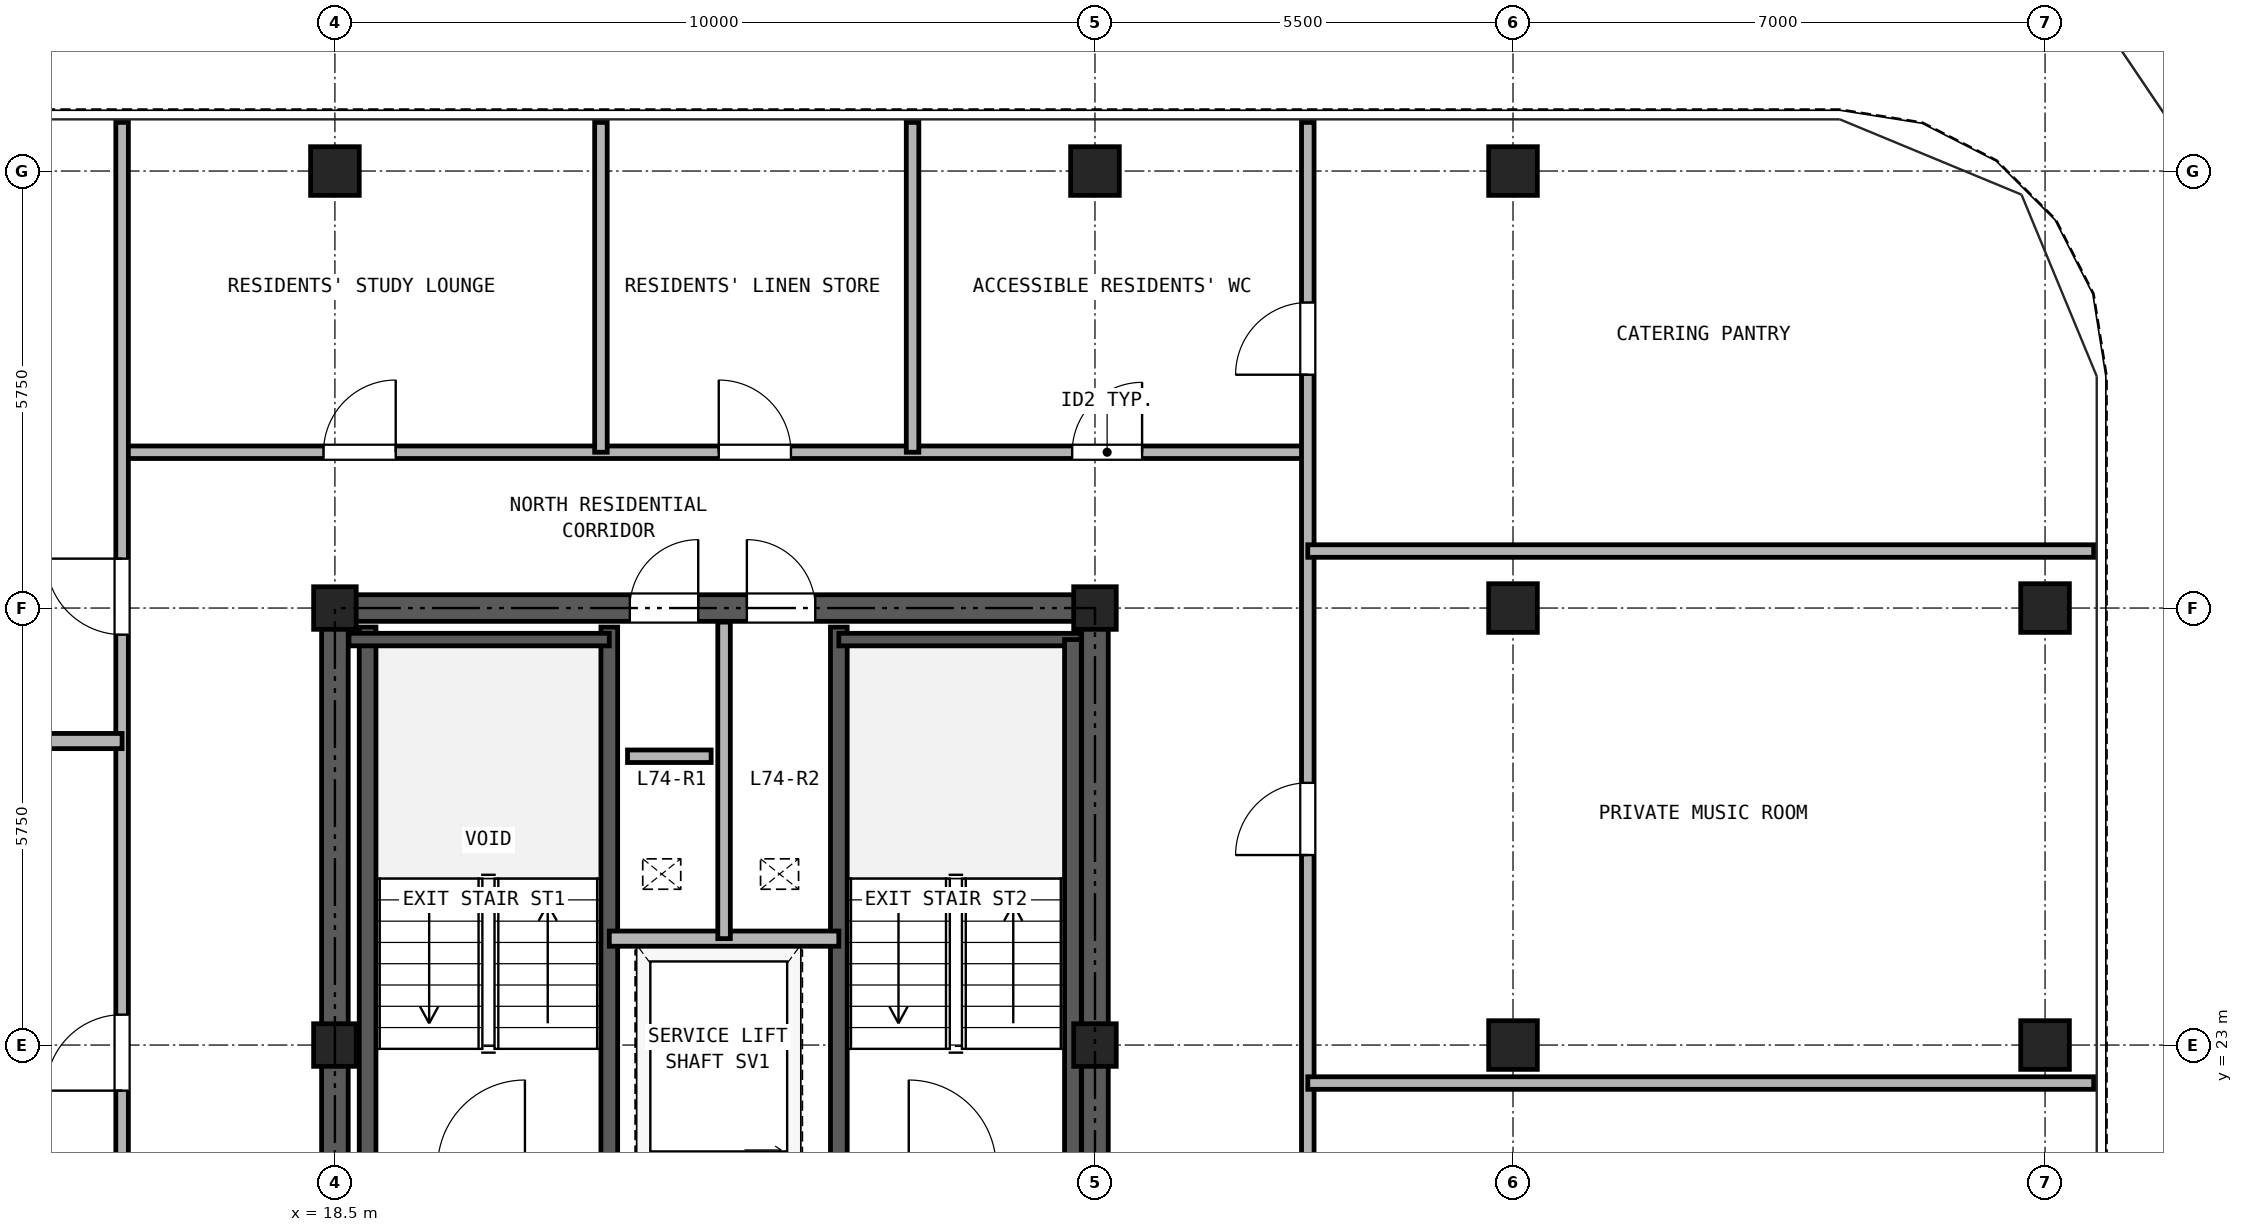
"""IFC4 building model, lengths in metres.
Left out: names, types, materials, properties, quantities, classifications, styles, units other than length and angle.
Written with IfcOpenShell. Run it as: python <this file> out.ifc"""

import sys

from ifc_helpers import new_model, si_unit, direction, frame, frame_2d, origin, origin_2d, place, context, subcontext, project, spatial, rectangle, hollow_rectangle, extrude, source, transform, mapped, element, fill, save


model = new_model("IFC4")
c1 = context("Model", 3, precision=1e-05, world=origin(), true_north=direction((0.0, 1.0)))
c2 = subcontext(c1, "Body", "Model", "MODEL_VIEW")
j1 = project(units=[si_unit("LENGTHUNIT", "METRE"), si_unit("PLANEANGLEUNIT", "RADIAN")], contexts=[c1])
p1 = place(None, origin())
s1 = spatial("IfcSite", under=j1, at=p1, CompositionType="ELEMENT")
p2 = place(p1, origin())
s2 = spatial("IfcBuilding", under=s1, at=p2, CompositionType="ELEMENT")
p3 = place(p2, frame((0.0, 0.0, 258.5)))
s3 = spatial("IfcBuildingStorey", under=s2, at=p3, CompositionType="ELEMENT", Elevation=258.5)
m1 = source(origin(), c2, "Body", "SweptSolid", [
    extrude(hollow_rectangle(XDim=0.64, YDim=0.64, WallThickness=0.035, at=origin_2d()), origin(), (0.0, 0.0, 1.0), 2.98),
])
for number, where, z_axis, x_axis in (
    (1, (18.5, 34.5, 0.0), (0.0, 0.0, 1.0), (1.0, 0.0, 0.0)),
    (2, (28.5, 34.5, 0.0), (0.0, 0.0, 1.0), (1.0, 0.0, 0.0)),
    (3, (34.0, 34.5, 0.0), (0.0, 0.0, 1.0), (1.0, 0.0, 0.0)),
    (4, (41.0, 23.0, 0.0), (0.0, 0.0, 1.0), (1.0, 0.0, 0.0)),
    (5, (41.0, 28.75, 0.0), (0.0, 0.0, 1.0), (1.0, 0.0, 0.0)),
):
    element("IfcColumn", number, at=place(p3, frame(where, z_axis=z_axis, x_axis=x_axis)), inside=s3, PredefinedType="COLUMN", context=c2, shape_type="MappedRepresentation", body=[
        mapped(m1, transform((0.0, 0.0, 0.0), x_axis=(1.0, 0.0, 0.0), y_axis=(0.0, 1.0, 0.0), z_axis=(0.0, 0.0, 1.0), scale=1.0)),
    ])
m2 = source(origin(), c2, "Body", "SweptSolid", [
    extrude(hollow_rectangle(XDim=0.56, YDim=0.56, WallThickness=0.03, at=origin_2d()), origin(), (0.0, 0.0, 1.0), 2.98),
])
for number, where, z_axis, x_axis in (
    (6, (18.5, 23.0, 0.0), (0.0, 0.0, 1.0), (1.0, 0.0, 0.0)),
    (7, (18.5, 28.75, 0.0), (0.0, 0.0, 1.0), (1.0, 0.0, 0.0)),
    (8, (28.5, 23.0, 0.0), (0.0, 0.0, 1.0), (1.0, 0.0, 0.0)),
    (9, (28.5, 28.75, 0.0), (0.0, 0.0, 1.0), (1.0, 0.0, 0.0)),
):
    element("IfcColumn", number, at=place(p3, frame(where, z_axis=z_axis, x_axis=x_axis)), inside=s3, PredefinedType="COLUMN", context=c2, shape_type="MappedRepresentation", body=[
        mapped(m2, transform((0.0, 0.0, 0.0), x_axis=(1.0, 0.0, 0.0), y_axis=(0.0, 1.0, 0.0), z_axis=(0.0, 0.0, 1.0), scale=1.0)),
    ])
for number, where, z_axis, x_axis in (
    (10, (34.0, 23.0, 0.0), (0.0, 0.0, 1.0), (1.0, 0.0, 0.0)),
    (11, (34.0, 28.75, 0.0), (0.0, 0.0, 1.0), (1.0, 0.0, 0.0)),
):
    element("IfcColumn", number, at=place(p3, frame(where, z_axis=z_axis, x_axis=x_axis)), inside=s3, PredefinedType="COLUMN", context=c2, shape_type="MappedRepresentation", body=[
        mapped(m1, transform((0.0, 0.0, 0.0), x_axis=(1.0, 0.0, 0.0), y_axis=(0.0, 1.0, 0.0), z_axis=(0.0, 0.0, 1.0), scale=1.0)),
    ])
p4 = place(p3, frame((18.325, 28.75, 0.0), z_axis=(0.0, 0.0, 1.0), x_axis=(1.0, 0.0, 0.0)))
e12 = element("IfcWall", 12, at=p4, inside=s3, PredefinedType="SHEAR", context=c2, shape_type="SweptSolid", body=[
    extrude(rectangle(XDim=10.35, YDim=0.35, at=frame_2d((5.175, 0.0))), origin(), (0.0, 0.0, 1.0), 2.98),
])
p5 = place(p4, frame((4.055, 0.0, 0.0)))
e13 = element("IfcOpeningElement", 13, at=p5, cuts=e12, PredefinedType="OPENING", context=c2, shape_type="SweptSolid", body=[
    extrude(rectangle(XDim=0.9, YDim=2.05, at=frame_2d((0.45, 1.025))), frame((0.0, 0.185, 0.0), z_axis=(0.0, -1.0, 0.0), x_axis=(1.0, 0.0, 0.0)), (0.0, 0.0, 1.0), 0.37),
])
p6 = place(p4, frame((5.595, 0.0, 0.0)))
e14 = element("IfcOpeningElement", 14, at=p6, cuts=e12, PredefinedType="OPENING", context=c2, shape_type="SweptSolid", body=[
    extrude(rectangle(XDim=0.9, YDim=2.05, at=frame_2d((0.45, 1.025))), frame((0.0, 0.185, 0.0), z_axis=(0.0, -1.0, 0.0), x_axis=(1.0, 0.0, 0.0)), (0.0, 0.0, 1.0), 0.37),
])
p7 = place(p3, frame((18.5, 11.675, 0.0), z_axis=(0.0, 0.0, 1.0), x_axis=(0.0, 1.0, 0.0)))
e15 = element("IfcWall", 15, at=p7, inside=s3, PredefinedType="SHEAR", context=c2, shape_type="SweptSolid", body=[
    extrude(rectangle(XDim=16.9, YDim=0.35, at=frame_2d((8.45, 0.0))), origin(), (0.0, 0.0, 1.0), 2.98),
])
p8 = place(p7, frame((7.475, 0.0, 0.0)))
e16 = element("IfcOpeningElement", 16, at=p8, cuts=e15, PredefinedType="OPENING", context=c2, shape_type="SweptSolid", body=[
    extrude(rectangle(XDim=1.15, YDim=2.2, at=frame_2d((0.575, 1.1))), frame((0.0, 0.185, 0.0), z_axis=(0.0, -1.0, 0.0), x_axis=(1.0, 0.0, 0.0)), (0.0, 0.0, 1.0), 0.37),
])
p9 = place(p3, frame((28.5, 11.675, 0.0), z_axis=(0.0, 0.0, 1.0), x_axis=(0.0, 1.0, 0.0)))
e17 = element("IfcWall", 17, at=p9, inside=s3, PredefinedType="SHEAR", context=c2, shape_type="SweptSolid", body=[
    extrude(rectangle(XDim=16.9, YDim=0.35, at=frame_2d((8.45, 0.0))), origin(), (0.0, 0.0, 1.0), 2.98),
])
p10 = place(p9, frame((7.475, 0.0, 0.0)))
e18 = element("IfcOpeningElement", 18, at=p10, cuts=e17, PredefinedType="OPENING", context=c2, shape_type="SweptSolid", body=[
    extrude(rectangle(XDim=1.15, YDim=2.2, at=frame_2d((0.575, 1.1))), frame((0.0, 0.185, 0.0), z_axis=(0.0, -1.0, 0.0), x_axis=(1.0, 0.0, 0.0)), (0.0, 0.0, 1.0), 0.37),
])
for number, where, z_axis, x_axis in (
    (19, (18.93, 21.39, 0.0), (0.0, 0.0, 1.0), (0.0, 1.0, 0.0)),
    (20, (22.11, 21.39, 0.0), (0.0, 0.0, 1.0), (0.0, 1.0, 0.0)),
    (21, (25.13, 21.39, 0.0), (0.0, 0.0, 1.0), (0.0, 1.0, 0.0)),
):
    element("IfcWall", number, at=place(p3, frame(where, z_axis=z_axis, x_axis=x_axis)), inside=s3, PredefinedType="SOLIDWALL", context=c2, shape_type="SweptSolid", body=[
        extrude(rectangle(XDim=7.11, YDim=0.22, at=frame_2d((3.555, 0.0))), origin(), (0.0, 0.0, 1.0), 2.98),
    ])
p11 = place(p3, frame((18.685, 28.335, 0.0), z_axis=(0.0, 0.0, 1.0), x_axis=(1.0, 0.0, 0.0)))
e22 = element("IfcWall", 22, at=p11, inside=s3, PredefinedType="PARTITIONING", context=c2, shape_type="SweptSolid", body=[
    extrude(rectangle(XDim=3.425, YDim=0.165, at=frame_2d((1.712, 0.0))), origin(), (0.0, 0.0, 1.0), 2.98),
])
p12 = place(p3, frame((25.13, 28.335, 0.0), z_axis=(0.0, 0.0, 1.0), x_axis=(1.0, 0.0, 0.0)))
e23 = element("IfcWall", 23, at=p12, inside=s3, PredefinedType="PARTITIONING", context=c2, shape_type="SweptSolid", body=[
    extrude(rectangle(XDim=3.185, YDim=0.165, at=frame_2d((1.593, 0.0))), origin(), (0.0, 0.0, 1.0), 2.98),
])
p13 = place(p3, frame((28.21, 21.39, 0.0), z_axis=(0.0, 0.0, 1.0), x_axis=(0.0, 1.0, 0.0)))
e24 = element("IfcWall", 24, at=p13, inside=s3, PredefinedType="SOLIDWALL", context=c2, shape_type="SweptSolid", body=[
    extrude(rectangle(XDim=6.945, YDim=0.22, at=frame_2d((3.473, 0.0))), origin(), (0.0, 0.0, 1.0), 2.98),
])
p14 = place(p3, frame((22.11, 24.4, 0.0), z_axis=(0.0, 0.0, 1.0), x_axis=(1.0, 0.0, 0.0)))
e25 = element("IfcWall", 25, at=p14, inside=s3, PredefinedType="PARTITIONING", context=c2, shape_type="SweptSolid", body=[
    extrude(rectangle(XDim=3.02, YDim=0.2, at=frame_2d((1.51, 0.0))), origin(), (0.0, 0.0, 1.0), 2.98),
])
p15 = place(p3, frame((23.62, 24.4, 0.0), z_axis=(0.0, 0.0, 1.0), x_axis=(0.0, 1.0, 0.0)))
e26 = element("IfcWall", 26, at=p15, inside=s3, PredefinedType="PARTITIONING", context=c2, shape_type="SweptSolid", body=[
    extrude(rectangle(XDim=4.165, YDim=0.165, at=frame_2d((2.083, 0.0))), origin(), (0.0, 0.0, 1.0), 2.98),
])
p16 = place(p3, frame((15.7, 30.8, 0.0), z_axis=(0.0, 0.0, 1.0), x_axis=(1.0, 0.0, 0.0)))
e27 = element("IfcWall", 27, at=p16, inside=s3, PredefinedType="PARTITIONING", context=c2, shape_type="SweptSolid", body=[
    extrude(rectangle(XDim=15.6, YDim=0.165, at=frame_2d((7.8, 0.0))), origin(), (0.0, 0.0, 1.0), 2.98),
])
p17 = place(p16, frame((2.65, 0.0, 0.0)))
e28 = element("IfcOpeningElement", 28, at=p17, cuts=e27, PredefinedType="OPENING", context=c2, shape_type="SweptSolid", body=[
    extrude(rectangle(XDim=0.95, YDim=2.15, at=frame_2d((0.475, 1.075))), frame((0.0, 0.093, 0.0), z_axis=(0.0, -1.0, 0.0), x_axis=(1.0, 0.0, 0.0)), (0.0, 0.0, 1.0), 0.185),
])
p18 = place(p16, frame((7.85, 0.0, 0.0)))
e29 = element("IfcOpeningElement", 29, at=p18, cuts=e27, PredefinedType="OPENING", context=c2, shape_type="SweptSolid", body=[
    extrude(rectangle(XDim=0.95, YDim=2.15, at=frame_2d((0.475, 1.075))), frame((0.0, 0.093, 0.0), z_axis=(0.0, -1.0, 0.0), x_axis=(1.0, 0.0, 0.0)), (0.0, 0.0, 1.0), 0.185),
])
p19 = place(p16, frame((12.5, 0.0, 0.0)))
e30 = element("IfcOpeningElement", 30, at=p19, cuts=e27, PredefinedType="OPENING", context=c2, shape_type="SweptSolid", body=[
    extrude(rectangle(XDim=0.92, YDim=2.1, at=frame_2d((0.46, 1.05))), frame((0.0, 0.093, 0.0), z_axis=(0.0, -1.0, 0.0), x_axis=(1.0, 0.0, 0.0)), (0.0, 0.0, 1.0), 0.185),
])
p20 = place(p3, frame((15.7, 10.85, 0.0), z_axis=(0.0, 0.0, 1.0), x_axis=(0.0, 1.0, 0.0)))
e31 = element("IfcWall", 31, at=p20, inside=s3, PredefinedType="PARTITIONING", context=c2, shape_type="SweptSolid", body=[
    extrude(rectangle(XDim=24.29, YDim=0.165, at=frame_2d((12.145, 0.0))), origin(), (0.0, 0.0, 1.0), 2.98),
])
p21 = place(p20, frame((3.475, 0.0, 0.0)))
e32 = element("IfcOpeningElement", 32, at=p21, cuts=e31, PredefinedType="OPENING", context=c2, shape_type="SweptSolid", body=[
    extrude(rectangle(XDim=1.0, YDim=2.15, at=frame_2d((0.5, 1.075))), frame((0.0, 0.093, 0.0), z_axis=(0.0, -1.0, 0.0), x_axis=(1.0, 0.0, 0.0)), (0.0, 0.0, 1.0), 0.185),
])
p22 = place(p20, frame((11.55, 0.0, 0.0)))
e33 = element("IfcOpeningElement", 33, at=p22, cuts=e31, PredefinedType="OPENING", context=c2, shape_type="SweptSolid", body=[
    extrude(rectangle(XDim=1.0, YDim=2.15, at=frame_2d((0.5, 1.075))), frame((0.0, 0.093, 0.0), z_axis=(0.0, -1.0, 0.0), x_axis=(1.0, 0.0, 0.0)), (0.0, 0.0, 1.0), 0.185),
])
p23 = place(p20, frame((17.55, 0.0, 0.0)))
e34 = element("IfcOpeningElement", 34, at=p23, cuts=e31, PredefinedType="OPENING", context=c2, shape_type="SweptSolid", body=[
    extrude(rectangle(XDim=1.0, YDim=2.15, at=frame_2d((0.5, 1.075))), frame((0.0, 0.093, 0.0), z_axis=(0.0, -1.0, 0.0), x_axis=(1.0, 0.0, 0.0)), (0.0, 0.0, 1.0), 0.185),
])
p24 = place(p3, frame((31.3, 10.85, 0.0), z_axis=(0.0, 0.0, 1.0), x_axis=(0.0, 1.0, 0.0)))
e35 = element("IfcWall", 35, at=p24, inside=s3, PredefinedType="PARTITIONING", context=c2, shape_type="SweptSolid", body=[
    extrude(rectangle(XDim=24.29, YDim=0.165, at=frame_2d((12.145, 0.0))), origin(), (0.0, 0.0, 1.0), 2.98),
])
p25 = place(p24, frame((5.325, 0.0, 0.0)))
e36 = element("IfcOpeningElement", 36, at=p25, cuts=e35, PredefinedType="OPENING", context=c2, shape_type="SweptSolid", body=[
    extrude(rectangle(XDim=0.95, YDim=2.15, at=frame_2d((0.475, 1.075))), frame((0.0, 0.093, 0.0), z_axis=(0.0, -1.0, 0.0), x_axis=(1.0, 0.0, 0.0)), (0.0, 0.0, 1.0), 0.185),
])
p26 = place(p24, frame((14.65, 0.0, 0.0)))
e37 = element("IfcOpeningElement", 37, at=p26, cuts=e35, PredefinedType="OPENING", context=c2, shape_type="SweptSolid", body=[
    extrude(rectangle(XDim=0.95, YDim=2.15, at=frame_2d((0.475, 1.075))), frame((0.0, 0.093, 0.0), z_axis=(0.0, -1.0, 0.0), x_axis=(1.0, 0.0, 0.0)), (0.0, 0.0, 1.0), 0.185),
])
p27 = place(p24, frame((20.97, 0.0, 0.0)))
e38 = element("IfcOpeningElement", 38, at=p27, cuts=e35, PredefinedType="OPENING", context=c2, shape_type="SweptSolid", body=[
    extrude(rectangle(XDim=0.95, YDim=2.15, at=frame_2d((0.475, 1.075))), frame((0.0, 0.093, 0.0), z_axis=(0.0, -1.0, 0.0), x_axis=(1.0, 0.0, 0.0)), (0.0, 0.0, 1.0), 0.185),
])
p28 = place(p3, frame((5.36, 27.0, 0.0), z_axis=(0.0, 0.0, 1.0), x_axis=(1.0, 0.0, 0.0)))
e39 = element("IfcWall", 39, at=p28, inside=s3, PredefinedType="PARTITIONING", context=c2, shape_type="SweptSolid", body=[
    extrude(rectangle(XDim=10.34, YDim=0.2, at=frame_2d((5.17, 0.0))), origin(), (0.0, 0.0, 1.0), 2.98),
])
for number, where, z_axis, x_axis in (
    (40, (31.3, 22.5, 0.0), (0.0, 0.0, 1.0), (1.0, 0.0, 0.0)),
    (41, (31.3, 29.5, 0.0), (0.0, 0.0, 1.0), (1.0, 0.0, 0.0)),
):
    element("IfcWall", number, at=place(p3, frame(where, z_axis=z_axis, x_axis=x_axis)), inside=s3, PredefinedType="PARTITIONING", context=c2, shape_type="SweptSolid", body=[
        extrude(rectangle(XDim=10.34, YDim=0.165, at=frame_2d((5.17, 0.0))), origin(), (0.0, 0.0, 1.0), 2.98),
    ])
for number, where, z_axis, x_axis in (
    (42, (22.0, 30.8, 0.0), (0.0, 0.0, 1.0), (0.0, 1.0, 0.0)),
    (43, (26.1, 30.8, 0.0), (0.0, 0.0, 1.0), (0.0, 1.0, 0.0)),
):
    element("IfcWall", number, at=place(p3, frame(where, z_axis=z_axis, x_axis=x_axis)), inside=s3, PredefinedType="PARTITIONING", context=c2, shape_type="SweptSolid", body=[
        extrude(rectangle(XDim=4.34, YDim=0.165, at=frame_2d((2.17, 0.0))), origin(), (0.0, 0.0, 1.0), 2.98),
    ])
p29 = place(p3, frame((22.35, 26.8, 0.0), z_axis=(0.0, 0.0, 1.0), x_axis=(1.0, 0.0, 0.0)))
e44 = element("IfcWall", 44, at=p29, inside=s3, PredefinedType="PARTITIONING", context=c2, shape_type="SweptSolid", body=[
    extrude(rectangle(XDim=1.1, YDim=0.165, at=frame_2d((0.55, 0.0))), origin(), (0.0, 0.0, 1.0), 2.98),
])
p30 = place(p5, origin())
e45 = element("IfcDoor", 45, at=p30, inside=s3, OperationType="SINGLE_SWING_RIGHT", PredefinedType="DOOR", context=c2, shape_type="SweptSolid", body=[
    extrude(rectangle(XDim=0.9, YDim=2.05, at=frame_2d((0.45, 1.025))), frame((0.0, 0.025, 0.0), z_axis=(0.0, -1.0, 0.0), x_axis=(1.0, 0.0, 0.0)), (0.0, 0.0, 1.0), 0.05),
])
fill(e13, e45)
p31 = place(p6, origin())
e46 = element("IfcDoor", 46, at=p31, inside=s3, OperationType="SINGLE_SWING_LEFT", PredefinedType="DOOR", context=c2, shape_type="SweptSolid", body=[
    extrude(rectangle(XDim=0.9, YDim=2.05, at=frame_2d((0.45, 1.025))), frame((0.0, 0.025, 0.0), z_axis=(0.0, -1.0, 0.0), x_axis=(1.0, 0.0, 0.0)), (0.0, 0.0, 1.0), 0.05),
])
fill(e14, e46)
p32 = place(p22, origin())
e47 = element("IfcDoor", 47, at=p32, inside=s3, OperationType="SINGLE_SWING_LEFT", PredefinedType="DOOR", context=c2, shape_type="SweptSolid", body=[
    extrude(rectangle(XDim=1.0, YDim=2.15, at=frame_2d((0.5, 1.075))), frame((0.0, 0.025, 0.0), z_axis=(0.0, -1.0, 0.0), x_axis=(1.0, 0.0, 0.0)), (0.0, 0.0, 1.0), 0.05),
])
fill(e33, e47)
p33 = place(p23, origin())
e48 = element("IfcDoor", 48, at=p33, inside=s3, OperationType="SINGLE_SWING_RIGHT", PredefinedType="DOOR", context=c2, shape_type="SweptSolid", body=[
    extrude(rectangle(XDim=1.0, YDim=2.15, at=frame_2d((0.5, 1.075))), frame((0.0, 0.025, 0.0), z_axis=(0.0, -1.0, 0.0), x_axis=(1.0, 0.0, 0.0)), (0.0, 0.0, 1.0), 0.05),
])
fill(e34, e48)
p34 = place(p26, origin())
e49 = element("IfcDoor", 49, at=p34, inside=s3, OperationType="SINGLE_SWING_LEFT", PredefinedType="DOOR", context=c2, shape_type="SweptSolid", body=[
    extrude(rectangle(XDim=0.95, YDim=2.15, at=frame_2d((0.475, 1.075))), frame((0.0, 0.025, 0.0), z_axis=(0.0, -1.0, 0.0), x_axis=(1.0, 0.0, 0.0)), (0.0, 0.0, 1.0), 0.05),
])
fill(e37, e49)
p35 = place(p27, origin())
e50 = element("IfcDoor", 50, at=p35, inside=s3, OperationType="SINGLE_SWING_LEFT", PredefinedType="DOOR", context=c2, shape_type="SweptSolid", body=[
    extrude(rectangle(XDim=0.95, YDim=2.15, at=frame_2d((0.475, 1.075))), frame((0.0, 0.025, 0.0), z_axis=(0.0, -1.0, 0.0), x_axis=(1.0, 0.0, 0.0)), (0.0, 0.0, 1.0), 0.05),
])
fill(e38, e50)
p36 = place(p17, origin())
e51 = element("IfcDoor", 51, at=p36, inside=s3, OperationType="SINGLE_SWING_RIGHT", PredefinedType="DOOR", context=c2, shape_type="SweptSolid", body=[
    extrude(rectangle(XDim=0.95, YDim=2.15, at=frame_2d((0.475, 1.075))), frame((0.0, 0.025, 0.0), z_axis=(0.0, -1.0, 0.0), x_axis=(1.0, 0.0, 0.0)), (0.0, 0.0, 1.0), 0.05),
])
fill(e28, e51)
p37 = place(p18, origin())
e52 = element("IfcDoor", 52, at=p37, inside=s3, OperationType="SINGLE_SWING_LEFT", PredefinedType="DOOR", context=c2, shape_type="SweptSolid", body=[
    extrude(rectangle(XDim=0.95, YDim=2.15, at=frame_2d((0.475, 1.075))), frame((0.0, 0.025, 0.0), z_axis=(0.0, -1.0, 0.0), x_axis=(1.0, 0.0, 0.0)), (0.0, 0.0, 1.0), 0.05),
])
fill(e29, e52)
p38 = place(p19, origin())
e53 = element("IfcDoor", 53, at=p38, inside=s3, OperationType="SINGLE_SWING_RIGHT", PredefinedType="DOOR", context=c2, shape_type="SweptSolid", body=[
    extrude(rectangle(XDim=0.92, YDim=2.1, at=frame_2d((0.46, 1.05))), frame((0.0, 0.025, 0.0), z_axis=(0.0, -1.0, 0.0), x_axis=(1.0, 0.0, 0.0)), (0.0, 0.0, 1.0), 0.05),
])
fill(e30, e53)
save(model, sys.argv[1])
